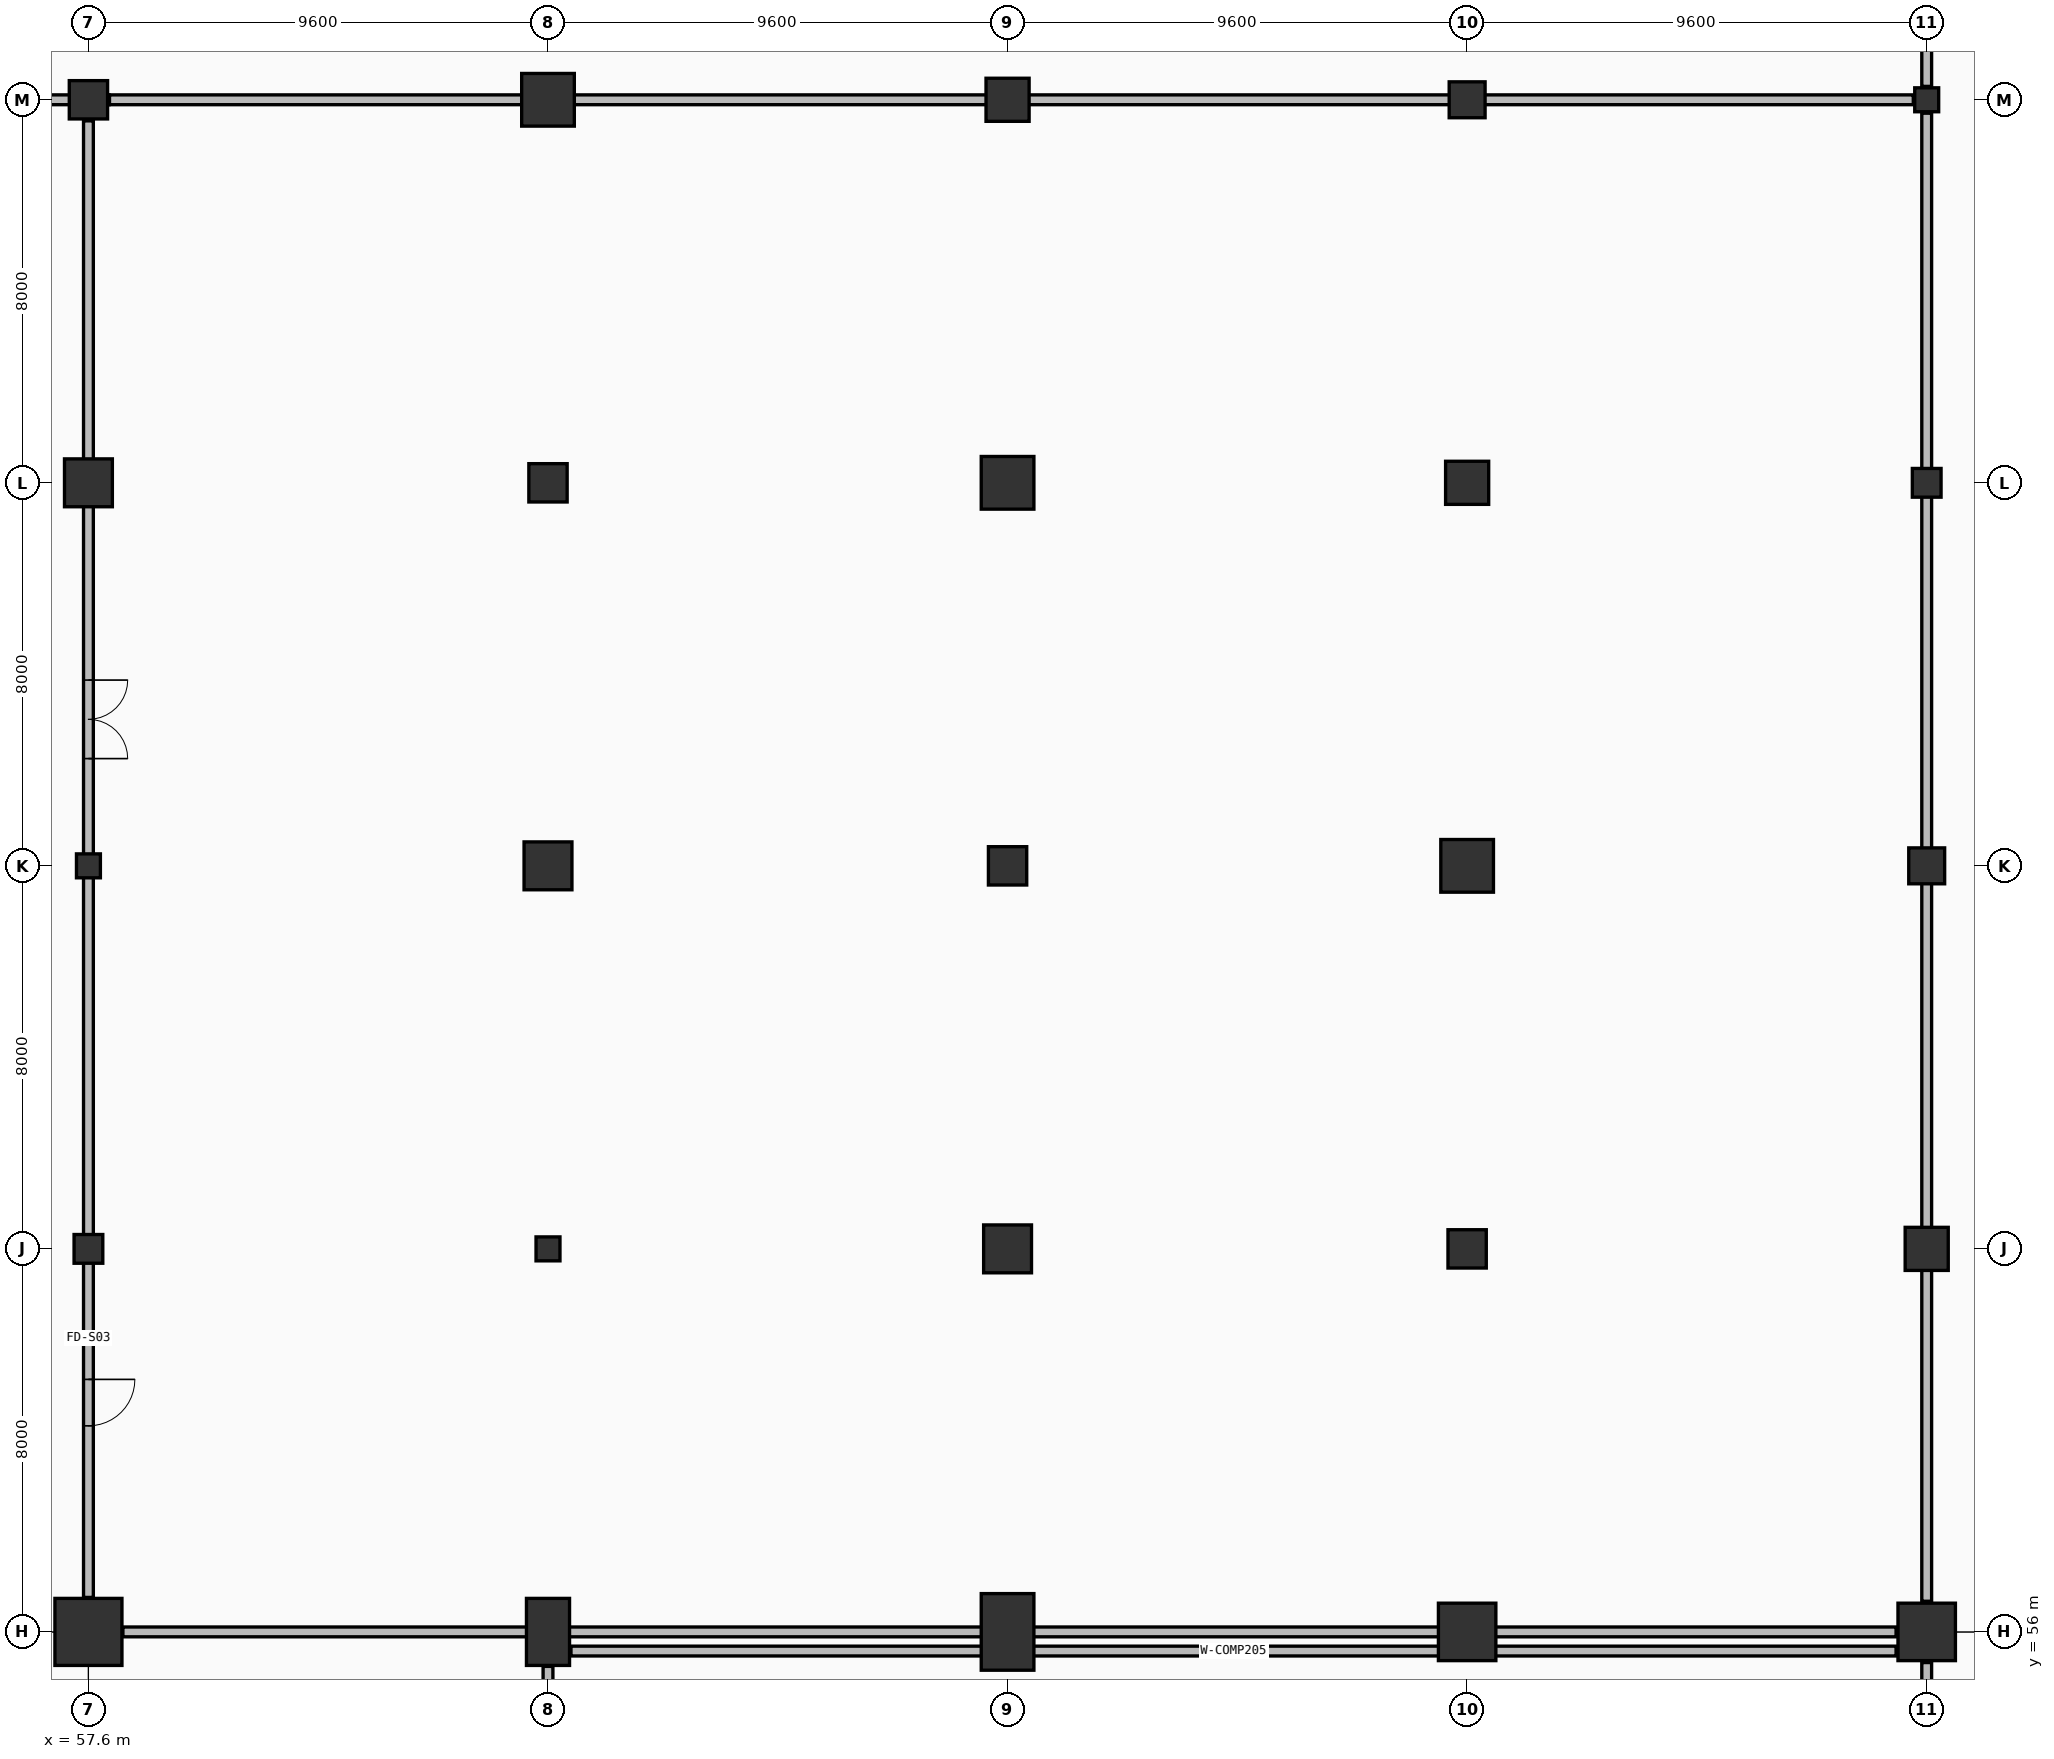
"""IFC4 building model, lengths in metres.
Left out: names, types, materials, properties, quantities, classifications, styles, units other than length and angle.
Written with IfcOpenShell. Run it as: python <this file> out.ifc"""

import sys

from ifc_helpers import new_model, si_unit, direction, frame, frame_2d, origin, origin_2d, place, context, subcontext, project, spatial, rectangle, circle, extrude, element, fill, save


model = new_model("IFC4")
c1 = context("Model", 3, precision=1e-05, world=origin(), true_north=direction((0.0, 1.0)))
c2 = subcontext(c1, "Body", "Model", "MODEL_VIEW")
j1 = project(units=[si_unit("LENGTHUNIT", "METRE"), si_unit("PLANEANGLEUNIT", "RADIAN")], contexts=[c1])
p1 = place(None, origin())
s1 = spatial("IfcSite", under=j1, at=p1, CompositionType="ELEMENT")
p2 = place(p1, origin())
s2 = spatial("IfcBuilding", under=s1, at=p2, CompositionType="ELEMENT")
p3 = place(p2, frame((0.0, 0.0, -5.4)))
s3 = spatial("IfcBuildingStorey", under=s2, at=p3, CompositionType="ELEMENT", Elevation=-5.4)
p4 = place(p3, frame((57.6, 56.0, 0.0), z_axis=(0.0, 0.0, 1.0), x_axis=(1.0, 0.0, 0.0)))
e1 = element("IfcColumn", 1, at=p4, inside=s3, PredefinedType="COLUMN", context=c2, shape_type="SweptSolid", body=[
    extrude(circle(Radius=0.7, at=origin_2d()), origin(), (0.0, 0.0, 1.0), 5.4),
])
p5 = place(p3, frame((57.6, 64.0, 0.0), z_axis=(0.0, 0.0, 1.0), x_axis=(1.0, 0.0, 0.0)))
e2 = element("IfcColumn", 2, at=p5, inside=s3, PredefinedType="COLUMN", context=c2, shape_type="SweptSolid", body=[
    extrude(rectangle(XDim=0.6, YDim=0.6, at=origin_2d()), origin(), (0.0, 0.0, 1.0), 5.4),
])
p6 = place(p3, frame((57.6, 72.0, 0.0), z_axis=(0.0, 0.0, 1.0), x_axis=(1.0, 0.0, 0.0)))
e3 = element("IfcColumn", 3, at=p6, inside=s3, PredefinedType="COLUMN", context=c2, shape_type="SweptSolid", body=[
    extrude(rectangle(XDim=0.5, YDim=0.5, at=origin_2d()), origin(), (0.0, 0.0, 1.0), 5.4),
])
p7 = place(p3, frame((57.6, 80.0, 0.0), z_axis=(0.0, 0.0, 1.0), x_axis=(1.0, 0.0, 0.0)))
e4 = element("IfcColumn", 4, at=p7, inside=s3, PredefinedType="COLUMN", context=c2, shape_type="SweptSolid", body=[
    extrude(circle(Radius=0.5, at=origin_2d()), origin(), (0.0, 0.0, 1.0), 5.4),
])
p8 = place(p3, frame((57.6, 88.0, 0.0), z_axis=(0.0, 0.0, 1.0), x_axis=(1.0, 0.0, 0.0)))
e5 = element("IfcColumn", 5, at=p8, inside=s3, PredefinedType="COLUMN", context=c2, shape_type="SweptSolid", body=[
    extrude(circle(Radius=0.4, at=origin_2d()), origin(), (0.0, 0.0, 1.0), 5.4),
])
p9 = place(p3, frame((67.2, 56.0, 0.0), z_axis=(0.0, 0.0, 1.0), x_axis=(1.0, 0.0, 0.0)))
e6 = element("IfcColumn", 6, at=p9, inside=s3, PredefinedType="COLUMN", context=c2, shape_type="SweptSolid", body=[
    extrude(rectangle(XDim=0.9, YDim=1.4, at=origin_2d()), origin(), (0.0, 0.0, 1.0), 5.4),
])
p10 = place(p3, frame((67.2, 64.0, 0.0), z_axis=(0.0, 0.0, 1.0), x_axis=(1.0, 0.0, 0.0)))
e7 = element("IfcColumn", 7, at=p10, inside=s3, PredefinedType="COLUMN", context=c2, shape_type="SweptSolid", body=[
    extrude(rectangle(XDim=0.5, YDim=0.5, at=origin_2d()), origin(), (0.0, 0.0, 1.0), 5.4),
])
p11 = place(p3, frame((67.2, 72.0, 0.0), z_axis=(0.0, 0.0, 1.0), x_axis=(1.0, 0.0, 0.0)))
e8 = element("IfcColumn", 8, at=p11, inside=s3, PredefinedType="COLUMN", context=c2, shape_type="SweptSolid", body=[
    extrude(circle(Radius=0.5, at=origin_2d()), origin(), (0.0, 0.0, 1.0), 5.4),
])
p12 = place(p3, frame((67.2, 80.0, 0.0), z_axis=(0.0, 0.0, 1.0), x_axis=(1.0, 0.0, 0.0)))
e9 = element("IfcColumn", 9, at=p12, inside=s3, PredefinedType="COLUMN", context=c2, shape_type="SweptSolid", body=[
    extrude(circle(Radius=0.4, at=origin_2d()), origin(), (0.0, 0.0, 1.0), 5.4),
])
p13 = place(p3, frame((67.2, 88.0, 0.0), z_axis=(0.0, 0.0, 1.0), x_axis=(1.0, 0.0, 0.0)))
e10 = element("IfcColumn", 10, at=p13, inside=s3, PredefinedType="COLUMN", context=c2, shape_type="SweptSolid", body=[
    extrude(rectangle(XDim=1.1, YDim=1.1, at=origin_2d()), origin(), (0.0, 0.0, 1.0), 5.4),
])
p14 = place(p3, frame((76.8, 56.0, 0.0), z_axis=(0.0, 0.0, 1.0), x_axis=(1.0, 0.0, 0.0)))
e11 = element("IfcColumn", 11, at=p14, inside=s3, PredefinedType="COLUMN", context=c2, shape_type="SweptSolid", body=[
    extrude(rectangle(XDim=1.1, YDim=1.6, at=origin_2d()), origin(), (0.0, 0.0, 1.0), 5.4),
])
p15 = place(p3, frame((76.8, 64.0, 0.0), z_axis=(0.0, 0.0, 1.0), x_axis=(1.0, 0.0, 0.0)))
e12 = element("IfcColumn", 12, at=p15, inside=s3, PredefinedType="COLUMN", context=c2, shape_type="SweptSolid", body=[
    extrude(circle(Radius=0.5, at=origin_2d()), origin(), (0.0, 0.0, 1.0), 5.4),
])
p16 = place(p3, frame((76.8, 72.0, 0.0), z_axis=(0.0, 0.0, 1.0), x_axis=(1.0, 0.0, 0.0)))
e13 = element("IfcColumn", 13, at=p16, inside=s3, PredefinedType="COLUMN", context=c2, shape_type="SweptSolid", body=[
    extrude(circle(Radius=0.4, at=origin_2d()), origin(), (0.0, 0.0, 1.0), 5.4),
])
p17 = place(p3, frame((76.8, 80.0, 0.0), z_axis=(0.0, 0.0, 1.0), x_axis=(1.0, 0.0, 0.0)))
e14 = element("IfcColumn", 14, at=p17, inside=s3, PredefinedType="COLUMN", context=c2, shape_type="SweptSolid", body=[
    extrude(rectangle(XDim=1.1, YDim=1.1, at=origin_2d()), origin(), (0.0, 0.0, 1.0), 5.4),
])
p18 = place(p3, frame((76.8, 88.0, 0.0), z_axis=(0.0, 0.0, 1.0), x_axis=(1.0, 0.0, 0.0)))
e15 = element("IfcColumn", 15, at=p18, inside=s3, PredefinedType="COLUMN", context=c2, shape_type="SweptSolid", body=[
    extrude(rectangle(XDim=0.9, YDim=0.9, at=origin_2d()), origin(), (0.0, 0.0, 1.0), 5.4),
])
p19 = place(p3, frame((86.4, 56.0, 0.0), z_axis=(0.0, 0.0, 1.0), x_axis=(1.0, 0.0, 0.0)))
e16 = element("IfcColumn", 16, at=p19, inside=s3, PredefinedType="COLUMN", context=c2, shape_type="SweptSolid", body=[
    extrude(circle(Radius=0.6, at=origin_2d()), origin(), (0.0, 0.0, 1.0), 5.4),
])
p20 = place(p3, frame((86.4, 64.0, 0.0), z_axis=(0.0, 0.0, 1.0), x_axis=(1.0, 0.0, 0.0)))
e17 = element("IfcColumn", 17, at=p20, inside=s3, PredefinedType="COLUMN", context=c2, shape_type="SweptSolid", body=[
    extrude(circle(Radius=0.4, at=origin_2d()), origin(), (0.0, 0.0, 1.0), 5.4),
])
p21 = place(p3, frame((86.4, 72.0, 0.0), z_axis=(0.0, 0.0, 1.0), x_axis=(1.0, 0.0, 0.0)))
e18 = element("IfcColumn", 18, at=p21, inside=s3, PredefinedType="COLUMN", context=c2, shape_type="SweptSolid", body=[
    extrude(rectangle(XDim=1.1, YDim=1.1, at=origin_2d()), origin(), (0.0, 0.0, 1.0), 5.4),
])
p22 = place(p3, frame((86.4, 80.0, 0.0), z_axis=(0.0, 0.0, 1.0), x_axis=(1.0, 0.0, 0.0)))
e19 = element("IfcColumn", 19, at=p22, inside=s3, PredefinedType="COLUMN", context=c2, shape_type="SweptSolid", body=[
    extrude(rectangle(XDim=0.9, YDim=0.9, at=origin_2d()), origin(), (0.0, 0.0, 1.0), 5.4),
])
p23 = place(p3, frame((86.4, 88.0, 0.0), z_axis=(0.0, 0.0, 1.0), x_axis=(1.0, 0.0, 0.0)))
e20 = element("IfcColumn", 20, at=p23, inside=s3, PredefinedType="COLUMN", context=c2, shape_type="SweptSolid", body=[
    extrude(rectangle(XDim=0.75, YDim=0.75, at=origin_2d()), origin(), (0.0, 0.0, 1.0), 5.4),
])
p24 = place(p3, frame((96.0, 56.0, 0.0), z_axis=(0.0, 0.0, 1.0), x_axis=(1.0, 0.0, 0.0)))
e21 = element("IfcColumn", 21, at=p24, inside=s3, PredefinedType="COLUMN", context=c2, shape_type="SweptSolid", body=[
    extrude(circle(Radius=0.6, at=origin_2d()), origin(), (0.0, 0.0, 1.0), 5.4),
])
p25 = place(p3, frame((96.0, 64.0, 0.0), z_axis=(0.0, 0.0, 1.0), x_axis=(1.0, 0.0, 0.0)))
e22 = element("IfcColumn", 22, at=p25, inside=s3, PredefinedType="COLUMN", context=c2, shape_type="SweptSolid", body=[
    extrude(rectangle(XDim=0.9, YDim=0.9, at=origin_2d()), origin(), (0.0, 0.0, 1.0), 5.4),
])
p26 = place(p3, frame((96.0, 72.0, 0.0), z_axis=(0.0, 0.0, 1.0), x_axis=(1.0, 0.0, 0.0)))
e23 = element("IfcColumn", 23, at=p26, inside=s3, PredefinedType="COLUMN", context=c2, shape_type="SweptSolid", body=[
    extrude(rectangle(XDim=0.75, YDim=0.75, at=origin_2d()), origin(), (0.0, 0.0, 1.0), 5.4),
])
p27 = place(p3, frame((96.0, 80.0, 0.0), z_axis=(0.0, 0.0, 1.0), x_axis=(1.0, 0.0, 0.0)))
e24 = element("IfcColumn", 24, at=p27, inside=s3, PredefinedType="COLUMN", context=c2, shape_type="SweptSolid", body=[
    extrude(rectangle(XDim=0.6, YDim=0.6, at=origin_2d()), origin(), (0.0, 0.0, 1.0), 5.4),
])
p28 = place(p3, frame((96.0, 88.0, 0.0), z_axis=(0.0, 0.0, 1.0), x_axis=(1.0, 0.0, 0.0)))
e25 = element("IfcColumn", 25, at=p28, inside=s3, PredefinedType="COLUMN", context=c2, shape_type="SweptSolid", body=[
    extrude(rectangle(XDim=0.5, YDim=0.5, at=origin_2d()), origin(), (0.0, 0.0, 1.0), 5.4),
])
p29 = place(p3, frame((96.0, 40.52, 0.0), z_axis=(0.0, 0.0, 1.0), x_axis=(0.0, 1.0, 0.0)))
e26 = element("IfcWall", 26, at=p29, inside=s3, PredefinedType="SOLIDWALL", context=c2, shape_type="SweptSolid", body=[
    extrude(rectangle(XDim=14.84, YDim=0.205, at=frame_2d((7.42, 0.0))), origin(), (0.0, 0.0, 1.0), 4.46),
])
p30 = place(p3, frame((95.36, 55.6, 0.0), z_axis=(0.0, 0.0, 1.0), x_axis=(-1.0, 0.0, 0.0)))
e27 = element("IfcWall", 27, at=p30, inside=s3, PredefinedType="SOLIDWALL", context=c2, shape_type="SweptSolid", body=[
    extrude(rectangle(XDim=27.68, YDim=0.205, at=frame_2d((13.84, 0.0))), origin(), (0.0, 0.0, 1.0), 4.49),
])
p31 = place(p3, frame((67.2, 55.28, 0.0), z_axis=(0.0, 0.0, 1.0), x_axis=(0.0, -1.0, 0.0)))
e28 = element("IfcWall", 28, at=p31, inside=s3, PredefinedType="SOLIDWALL", context=c2, shape_type="SweptSolid", body=[
    extrude(rectangle(XDim=14.8, YDim=0.205, at=frame_2d((7.4, 0.0))), origin(), (0.0, 0.0, 1.0), 4.39),
])
p32 = place(p3, frame((57.6, 87.56, 0.0), z_axis=(0.0, 0.0, 1.0), x_axis=(0.0, -1.0, 0.0)))
e29 = element("IfcWall", 29, at=p32, inside=s3, PredefinedType="SOLIDWALL", context=c2, shape_type="SweptSolid", body=[
    extrude(rectangle(XDim=30.84, YDim=0.205, at=frame_2d((15.42, 0.0))), origin(), (0.0, 0.0, 1.0), 4.32),
])
p33 = place(p32, frame((11.68, 0.0, 0.0)))
e30 = element("IfcOpeningElement", 30, at=p33, cuts=e29, PredefinedType="OPENING", context=c2, shape_type="SweptSolid", body=[
    extrude(rectangle(XDim=1.64, YDim=2.2, at=frame_2d((0.82, 1.1))), frame((0.0, 0.113, 0.0), z_axis=(0.0, -1.0, 0.0), x_axis=(1.0, 0.0, 0.0)), (0.0, 0.0, 1.0), 0.225),
])
p34 = place(p32, frame((26.286, 0.0, 0.0)))
e31 = element("IfcOpeningElement", 31, at=p34, cuts=e29, PredefinedType="OPENING", context=c2, shape_type="SweptSolid", body=[
    extrude(rectangle(XDim=0.97, YDim=2.1, at=frame_2d((0.485, 1.05))), frame((0.0, 0.113, 0.0), z_axis=(0.0, -1.0, 0.0), x_axis=(1.0, 0.0, 0.0)), (0.0, 0.0, 1.0), 0.225),
])
p35 = place(p3, frame((58.32, 56.0, 0.0), z_axis=(0.0, 0.0, 1.0), x_axis=(1.0, 0.0, 0.0)))
e32 = element("IfcWall", 32, at=p35, inside=s3, PredefinedType="SOLIDWALL", context=c2, shape_type="SweptSolid", body=[
    extrude(rectangle(XDim=37.04, YDim=0.205, at=frame_2d((18.52, 0.0))), origin(), (0.0, 0.0, 1.0), 4.32),
])
p36 = place(p3, frame((96.0, 56.64, 0.0), z_axis=(0.0, 0.0, 1.0), x_axis=(0.0, 1.0, 0.0)))
e33 = element("IfcWall", 33, at=p36, inside=s3, PredefinedType="SOLIDWALL", context=c2, shape_type="SweptSolid", body=[
    extrude(rectangle(XDim=31.08, YDim=0.205, at=frame_2d((15.54, 0.0))), origin(), (0.0, 0.0, 1.0), 4.02),
])
p37 = place(p3, frame((95.72, 88.0, 0.0), z_axis=(0.0, 0.0, 1.0), x_axis=(-1.0, 0.0, 0.0)))
e34 = element("IfcWall", 34, at=p37, inside=s3, PredefinedType="SOLIDWALL", context=c2, shape_type="SweptSolid", body=[
    extrude(rectangle(XDim=37.68, YDim=0.205, at=frame_2d((18.84, 0.0))), origin(), (0.0, 0.0, 1.0), 4.02),
])
p38 = place(p3, frame((48.52, 88.0, 0.0), z_axis=(0.0, 0.0, 1.0), x_axis=(1.0, 0.0, 0.0)))
e35 = element("IfcWall", 35, at=p38, inside=s3, PredefinedType="SOLIDWALL", context=c2, shape_type="SweptSolid", body=[
    extrude(rectangle(XDim=9.512, YDim=0.205, at=frame_2d((4.756, 0.0))), origin(), (0.0, 0.0, 1.0), 4.02),
])
p39 = place(p38, frame((3.117, 0.0, 0.0)))
e36 = element("IfcOpeningElement", 36, at=p39, cuts=e35, PredefinedType="OPENING", context=c2, shape_type="SweptSolid", body=[
    extrude(rectangle(XDim=1.72, YDim=2.24, at=frame_2d((0.86, 1.12))), frame((0.0, 0.113, 0.0), z_axis=(0.0, -1.0, 0.0), x_axis=(1.0, 0.0, 0.0)), (0.0, 0.0, 1.0), 0.225),
])
p40 = place(p38, frame((6.192, 0.0, 0.0)))
e37 = element("IfcOpeningElement", 37, at=p40, cuts=e35, PredefinedType="OPENING", context=c2, shape_type="SweptSolid", body=[
    extrude(rectangle(XDim=1.03, YDim=2.14, at=frame_2d((0.515, 1.07))), frame((0.0, 0.113, 0.0), z_axis=(0.0, -1.0, 0.0), x_axis=(1.0, 0.0, 0.0)), (0.0, 0.0, 1.0), 0.225),
])
p41 = place(p3, frame((96.0, 88.28, 0.0), z_axis=(0.0, 0.0, 1.0), x_axis=(0.0, 1.0, 0.0)))
e38 = element("IfcWall", 38, at=p41, inside=s3, PredefinedType="SOLIDWALL", context=c2, shape_type="SweptSolid", body=[
    extrude(rectangle(XDim=23.146, YDim=0.205, at=frame_2d((11.573, 0.0))), origin(), (0.0, 0.0, 1.0), 4.05),
])
p42 = place(p33, origin())
e39 = element("IfcDoor", 39, at=p42, inside=s3, OperationType="DOUBLE_DOOR_SINGLE_SWING", PredefinedType="DOOR", context=c2, shape_type="SweptSolid", body=[
    extrude(rectangle(XDim=1.64, YDim=2.2, at=frame_2d((0.82, 1.1))), frame((0.0, 0.025, 0.0), z_axis=(0.0, -1.0, 0.0), x_axis=(1.0, 0.0, 0.0)), (0.0, 0.0, 1.0), 0.05),
])
fill(e30, e39)
p43 = place(p34, origin())
e40 = element("IfcDoor", 40, at=p43, inside=s3, OperationType="SINGLE_SWING_RIGHT", PredefinedType="DOOR", context=c2, shape_type="SweptSolid", body=[
    extrude(rectangle(XDim=0.97, YDim=2.1, at=frame_2d((0.485, 1.05))), frame((0.0, 0.025, 0.0), z_axis=(0.0, -1.0, 0.0), x_axis=(1.0, 0.0, 0.0)), (0.0, 0.0, 1.0), 0.05),
])
fill(e31, e40)
save(model, sys.argv[1])
